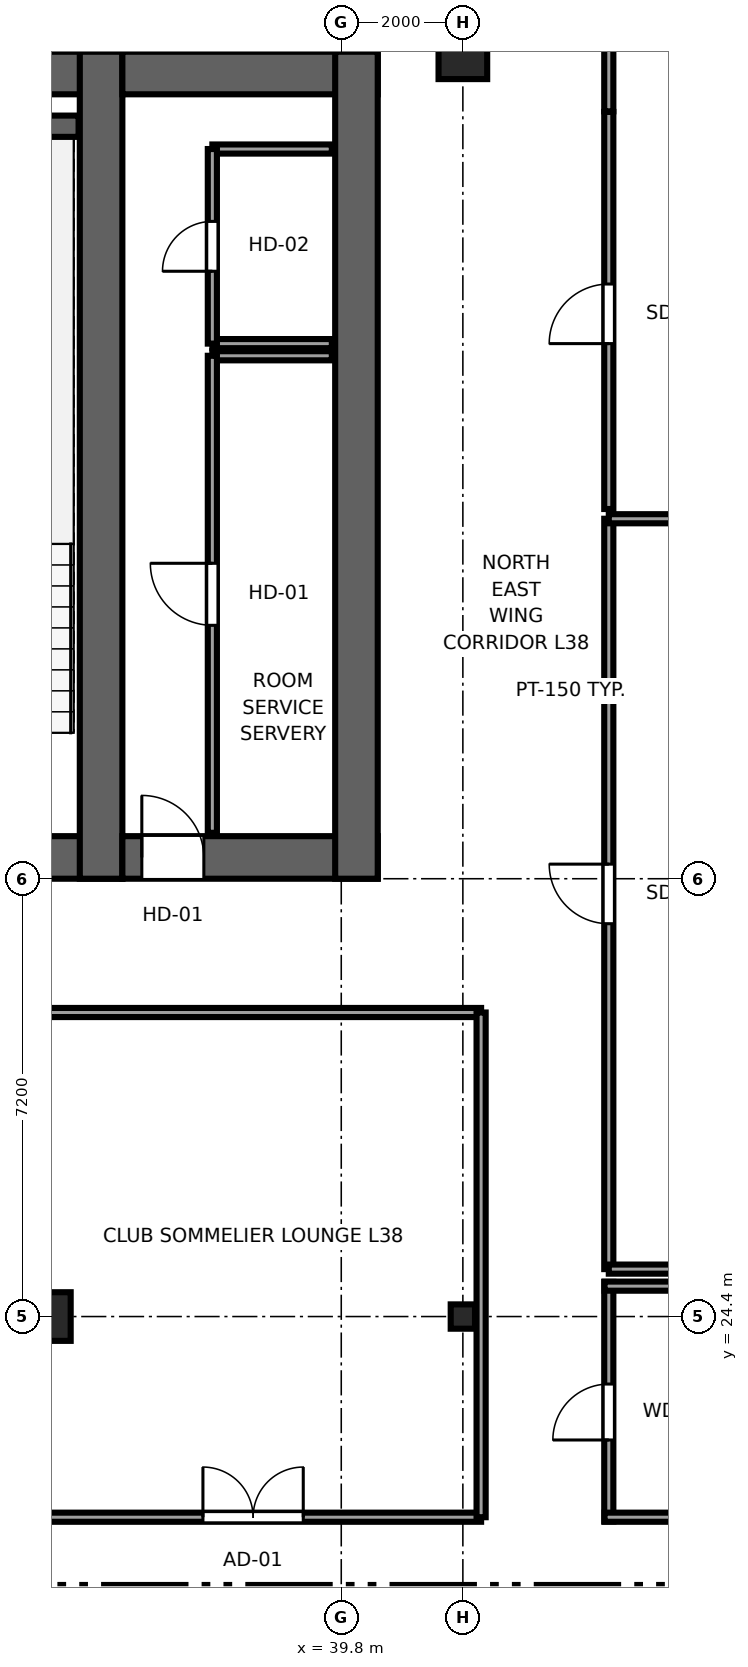
"""IFC4 building model, lengths in metres.
Left out: names, types, materials, properties, quantities, classifications, styles, units other than length and angle.
Written with IfcOpenShell. Run it as: python <this file> out.ifc"""

import sys

from ifc_helpers import new_model, si_unit, direction, frame, frame_2d, origin, origin_2d, place, context, subcontext, project, spatial, rectangle, i_section, extrude, source, transform, mapped, element, fill, save


model = new_model("IFC4")
c1 = context("Model", 3, precision=1e-05, world=origin(), true_north=direction((0.0, 1.0)))
c2 = subcontext(c1, "Body", "Model", "MODEL_VIEW")
j1 = project(units=[si_unit("LENGTHUNIT", "METRE"), si_unit("PLANEANGLEUNIT", "RADIAN")], contexts=[c1])
p1 = place(None, origin())
s1 = spatial("IfcSite", under=j1, at=p1, CompositionType="ELEMENT")
p2 = place(p1, origin())
s2 = spatial("IfcBuilding", under=s1, at=p2, CompositionType="ELEMENT")
p3 = place(p2, frame((0.0, 0.0, 147.05)))
s3 = spatial("IfcBuildingStorey", under=s2, at=p3, CompositionType="ELEMENT", Elevation=147.05)
p4 = place(p3, frame((9.8, 31.95, 0.0), z_axis=(0.0, 0.0, 1.0), x_axis=(1.0, 0.0, 0.0)))
e1 = element("IfcWall", 1, at=p4, inside=s3, PredefinedType="SHEAR", context=c2, shape_type="SweptSolid", body=[
    extrude(rectangle(XDim=26.4, YDim=0.7, at=frame_2d((13.2, 0.0))), origin(), (0.0, 0.0, 1.0), 3.55),
])
p5 = place(p4, frame((6.32, 0.0, 0.0), z_axis=(0.0, 0.0, 1.0), x_axis=(-1.0, 0.0, 0.0)))
e2 = element("IfcOpeningElement", 2, at=p5, cuts=e1, PredefinedType="OPENING", context=c2, shape_type="SweptSolid", body=[
    extrude(rectangle(XDim=1.5, YDim=2.04, at=frame_2d((0.75, 1.02))), frame((0.0, 0.36, 0.0), z_axis=(0.0, -1.0, 0.0), x_axis=(1.0, 0.0, 0.0)), (0.0, 0.0, 1.0), 0.72),
])
p6 = place(p4, frame((13.95, 0.0, 0.0), z_axis=(0.0, 0.0, 1.0), x_axis=(-1.0, 0.0, 0.0)))
e3 = element("IfcOpeningElement", 3, at=p6, cuts=e1, PredefinedType="OPENING", context=c2, shape_type="SweptSolid", body=[
    extrude(rectangle(XDim=1.5, YDim=2.04, at=frame_2d((0.75, 1.02))), frame((0.0, 0.36, 0.0), z_axis=(0.0, -1.0, 0.0), x_axis=(1.0, 0.0, 0.0)), (0.0, 0.0, 1.0), 0.72),
])
p7 = place(p4, frame((21.58, 0.0, 0.0), z_axis=(0.0, 0.0, 1.0), x_axis=(-1.0, 0.0, 0.0)))
e4 = element("IfcOpeningElement", 4, at=p7, cuts=e1, PredefinedType="OPENING", context=c2, shape_type="SweptSolid", body=[
    extrude(rectangle(XDim=1.5, YDim=2.04, at=frame_2d((0.75, 1.02))), frame((0.0, 0.36, 0.0), z_axis=(0.0, -1.0, 0.0), x_axis=(1.0, 0.0, 0.0)), (0.0, 0.0, 1.0), 0.72),
])
p8 = place(p4, frame((8.37, 0.0, 0.0), z_axis=(0.0, 0.0, 1.0), x_axis=(-1.0, 0.0, 0.0)))
e5 = element("IfcOpeningElement", 5, at=p8, cuts=e1, PredefinedType="OPENING", context=c2, shape_type="SweptSolid", body=[
    extrude(rectangle(XDim=0.82, YDim=2.01, at=frame_2d((0.41, 1.005))), frame((0.0, 0.36, 0.0), z_axis=(0.0, -1.0, 0.0), x_axis=(1.0, 0.0, 0.0)), (0.0, 0.0, 1.0), 0.72),
])
p9 = place(p4, frame((18.87, 0.0, 0.0), z_axis=(0.0, 0.0, 1.0), x_axis=(-1.0, 0.0, 0.0)))
e6 = element("IfcOpeningElement", 6, at=p9, cuts=e1, PredefinedType="OPENING", context=c2, shape_type="SweptSolid", body=[
    extrude(rectangle(XDim=0.82, YDim=2.01, at=frame_2d((0.41, 1.005))), frame((0.0, 0.36, 0.0), z_axis=(0.0, -1.0, 0.0), x_axis=(1.0, 0.0, 0.0)), (0.0, 0.0, 1.0), 0.72),
])
p10 = place(p3, frame((9.8, 44.85, 0.0), z_axis=(0.0, 0.0, 1.0), x_axis=(1.0, 0.0, 0.0)))
e7 = element("IfcWall", 7, at=p10, inside=s3, PredefinedType="SHEAR", context=c2, shape_type="SweptSolid", body=[
    extrude(rectangle(XDim=26.4, YDim=0.7, at=frame_2d((13.2, 0.0))), origin(), (0.0, 0.0, 1.0), 3.55),
])
p11 = place(p3, frame((35.85, 31.6, 0.0), z_axis=(0.0, 0.0, 1.0), x_axis=(0.0, 1.0, 0.0)))
e8 = element("IfcWall", 8, at=p11, inside=s3, PredefinedType="SHEAR", context=c2, shape_type="SweptSolid", body=[
    extrude(rectangle(XDim=13.6, YDim=0.7, at=frame_2d((6.8, 0.0))), origin(), (0.0, 0.0, 1.0), 3.55),
])
p12 = place(p3, frame((36.2, 31.95, 0.0), z_axis=(0.0, 0.0, 1.0), x_axis=(1.0, 0.0, 0.0)))
e9 = element("IfcWall", 9, at=p12, inside=s3, PredefinedType="SHEAR", context=c2, shape_type="SweptSolid", body=[
    extrude(rectangle(XDim=4.2, YDim=0.7, at=frame_2d((2.1, 0.0))), origin(), (0.0, 0.0, 1.0), 3.55),
])
p13 = place(p12, frame((1.34, 0.0, 0.0), z_axis=(0.0, 0.0, 1.0), x_axis=(-1.0, 0.0, 0.0)))
e10 = element("IfcOpeningElement", 10, at=p13, cuts=e9, PredefinedType="OPENING", context=c2, shape_type="SweptSolid", body=[
    extrude(rectangle(XDim=1.02, YDim=2.03, at=frame_2d((0.51, 1.015))), frame((0.0, 0.36, 0.0), z_axis=(0.0, -1.0, 0.0), x_axis=(1.0, 0.0, 0.0)), (0.0, 0.0, 1.0), 0.72),
])
p14 = place(p3, frame((36.2, 44.85, 0.0), z_axis=(0.0, 0.0, 1.0), x_axis=(1.0, 0.0, 0.0)))
e11 = element("IfcWall", 11, at=p14, inside=s3, PredefinedType="SHEAR", context=c2, shape_type="SweptSolid", body=[
    extrude(rectangle(XDim=4.2, YDim=0.7, at=frame_2d((2.1, 0.0))), origin(), (0.0, 0.0, 1.0), 3.55),
])
p15 = place(p3, frame((40.05, 31.6, 0.0), z_axis=(0.0, 0.0, 1.0), x_axis=(0.0, 1.0, 0.0)))
e12 = element("IfcWall", 12, at=p15, inside=s3, PredefinedType="SHEAR", context=c2, shape_type="SweptSolid", body=[
    extrude(rectangle(XDim=13.6, YDim=0.7, at=frame_2d((6.8, 0.0))), origin(), (0.0, 0.0, 1.0), 3.55),
])
p16 = place(p3, frame((31.88, 43.975, 0.0), z_axis=(0.0, 0.0, 1.0), x_axis=(1.0, 0.0, 0.0)))
e13 = element("IfcWall", 13, at=p16, inside=s3, PredefinedType="SHEAR", context=c2, shape_type="SweptSolid", body=[
    extrude(rectangle(XDim=3.6, YDim=0.35, at=frame_2d((1.8, 0.0))), origin(), (0.0, 0.0, 1.0), 3.55),
])
m1 = source(origin(), c2, "Body", "SweptSolid", [
    extrude(rectangle(XDim=0.8, YDim=0.8, at=origin_2d()), origin(), (0.0, 0.0, 1.0), 3.55),
])
p17 = place(p3, frame((34.95, 24.4, 0.0), z_axis=(0.0, 0.0, 1.0), x_axis=(1.0, 0.0, 0.0)))
e14 = element("IfcColumn", 14, at=p17, inside=s3, PredefinedType="COLUMN", context=c2, shape_type="MappedRepresentation", body=[
    mapped(m1, transform((0.0, 0.0, 0.0), x_axis=(1.0, 0.0, 0.0), y_axis=(0.0, 1.0, 0.0), z_axis=(0.0, 0.0, 1.0), scale=1.0)),
])
m2 = source(origin(), c2, "Body", "SweptSolid", [
    extrude(i_section(OverallWidth=0.4, OverallDepth=0.4, WebThickness=0.02, FlangeThickness=0.035, at=origin_2d()), origin(), (0.0, 0.0, 1.0), 3.55),
])
p18 = place(p3, frame((41.8, 24.4, 0.0), z_axis=(0.0, 0.0, 1.0), x_axis=(1.0, 0.0, 0.0)))
e15 = element("IfcColumn", 15, at=p18, inside=s3, PredefinedType="COLUMN", context=c2, shape_type="MappedRepresentation", body=[
    mapped(m2, transform((0.0, 0.0, 0.0), x_axis=(1.0, 0.0, 0.0), y_axis=(0.0, 1.0, 0.0), z_axis=(0.0, 0.0, 1.0), scale=1.0)),
])
p19 = place(p3, frame((41.8, 45.15, 0.0), z_axis=(0.0, 0.0, 1.0), x_axis=(1.0, 0.0, 0.0)))
e16 = element("IfcColumn", 16, at=p19, inside=s3, PredefinedType="COLUMN", context=c2, shape_type="MappedRepresentation", body=[
    mapped(m1, transform((0.0, 0.0, 0.0), x_axis=(1.0, 0.0, 0.0), y_axis=(0.0, 1.0, 0.0), z_axis=(0.0, 0.0, 1.0), scale=1.0)),
])
p20 = place(p3, frame((37.68, 40.2, 0.0), z_axis=(0.0, 0.0, 1.0), x_axis=(1.0, 0.0, 0.0)))
e17 = element("IfcWall", 17, at=p20, inside=s3, PredefinedType="PARTITIONING", context=c2, shape_type="SweptSolid", body=[
    extrude(rectangle(XDim=1.965, YDim=0.15, at=frame_2d((0.982, 0.0))), origin(), (0.0, 0.0, 1.0), 3.37),
])
p21 = place(p3, frame((37.68, 32.355, 0.0), z_axis=(0.0, 0.0, 1.0), x_axis=(0.0, 1.0, 0.0)))
e18 = element("IfcWall", 18, at=p21, inside=s3, PredefinedType="PARTITIONING", context=c2, shape_type="SweptSolid", body=[
    extrude(rectangle(XDim=7.845, YDim=0.15, at=frame_2d((3.922, 0.0))), origin(), (0.0, 0.0, 1.0), 3.37),
])
p22 = place(p21, frame((3.413, 0.0, 0.0)))
e19 = element("IfcOpeningElement", 19, at=p22, cuts=e18, PredefinedType="OPENING", context=c2, shape_type="SweptSolid", body=[
    extrude(rectangle(XDim=1.02, YDim=2.03, at=frame_2d((0.51, 1.015))), frame((0.0, 0.085, 0.0), z_axis=(0.0, -1.0, 0.0), x_axis=(1.0, 0.0, 0.0)), (0.0, 0.0, 1.0), 0.17),
])
for number, where, z_axis, x_axis in (
    (20, (37.68, 40.4, 0.0), (0.0, 0.0, 1.0), (1.0, 0.0, 0.0)),
    (21, (37.68, 43.6, 0.0), (0.0, 0.0, 1.0), (1.0, 0.0, 0.0)),
):
    element("IfcWall", number, at=place(p3, frame(where, z_axis=z_axis, x_axis=x_axis)), inside=s3, PredefinedType="PARTITIONING", context=c2, shape_type="SweptSolid", body=[
        extrude(rectangle(XDim=1.965, YDim=0.15, at=frame_2d((0.982, 0.0))), origin(), (0.0, 0.0, 1.0), 3.37),
    ])
p23 = place(p3, frame((37.68, 40.4, 0.0), z_axis=(0.0, 0.0, 1.0), x_axis=(0.0, 1.0, 0.0)))
e22 = element("IfcWall", 22, at=p23, inside=s3, PredefinedType="PARTITIONING", context=c2, shape_type="SweptSolid", body=[
    extrude(rectangle(XDim=3.2, YDim=0.15, at=frame_2d((1.6, 0.0))), origin(), (0.0, 0.0, 1.0), 3.37),
])
p24 = place(p23, frame((1.19, 0.0, 0.0)))
e23 = element("IfcOpeningElement", 23, at=p24, cuts=e22, PredefinedType="OPENING", context=c2, shape_type="SweptSolid", body=[
    extrude(rectangle(XDim=0.82, YDim=2.01, at=frame_2d((0.41, 1.005))), frame((0.0, 0.085, 0.0), z_axis=(0.0, -1.0, 0.0), x_axis=(1.0, 0.0, 0.0)), (0.0, 0.0, 1.0), 0.17),
])
p25 = place(p3, frame((44.2, 21.03, 0.0), z_axis=(0.0, 0.0, 1.0), x_axis=(0.0, 1.0, 0.0)))
e24 = element("IfcWall", 24, at=p25, inside=s3, PredefinedType="PARTITIONING", context=c2, shape_type="SweptSolid", body=[
    extrude(rectangle(XDim=3.94, YDim=0.15, at=frame_2d((1.97, 0.0))), origin(), (0.0, 0.0, 1.0), 3.37),
])
p26 = place(p25, frame((1.34, 0.0, 0.0)))
e25 = element("IfcOpeningElement", 25, at=p26, cuts=e24, PredefinedType="OPENING", context=c2, shape_type="SweptSolid", body=[
    extrude(rectangle(XDim=0.92, YDim=2.01, at=frame_2d((0.46, 1.005))), frame((0.0, 0.085, 0.0), z_axis=(0.0, -1.0, 0.0), x_axis=(1.0, 0.0, 0.0)), (0.0, 0.0, 1.0), 0.17),
])
for number, where, z_axis, x_axis in (
    (26, (44.13, 21.1, 0.0), (0.0, 0.0, 1.0), (1.0, 0.0, 0.0)),
    (27, (44.13, 24.9, 0.0), (0.0, 0.0, 1.0), (1.0, 0.0, 0.0)),
):
    element("IfcWall", number, at=place(p3, frame(where, z_axis=z_axis, x_axis=x_axis)), inside=s3, PredefinedType="PARTITIONING", context=c2, shape_type="SweptSolid", body=[
        extrude(rectangle(XDim=4.54, YDim=0.15, at=frame_2d((2.27, 0.0))), origin(), (0.0, 0.0, 1.0), 3.37),
    ])
p27 = place(p3, frame((44.2, 25.18, 0.0), z_axis=(0.0, 0.0, 1.0), x_axis=(0.0, 1.0, 0.0)))
e28 = element("IfcWall", 28, at=p27, inside=s3, PredefinedType="PARTITIONING", context=c2, shape_type="SweptSolid", body=[
    extrude(rectangle(XDim=12.34, YDim=0.15, at=frame_2d((6.17, 0.0))), origin(), (0.0, 0.0, 1.0), 3.37),
])
p28 = place(p27, frame((5.68, 0.0, 0.0)))
e29 = element("IfcOpeningElement", 29, at=p28, cuts=e28, PredefinedType="OPENING", context=c2, shape_type="SweptSolid", body=[
    extrude(rectangle(XDim=0.98, YDim=2.12, at=frame_2d((0.49, 1.06))), frame((0.0, 0.085, 0.0), z_axis=(0.0, -1.0, 0.0), x_axis=(1.0, 0.0, 0.0)), (0.0, 0.0, 1.0), 0.17),
])
p29 = place(p3, frame((44.2, 25.18, 0.0), z_axis=(0.0, 0.0, 1.0), x_axis=(1.0, 0.0, 0.0)))
e30 = element("IfcWall", 30, at=p29, inside=s3, PredefinedType="PARTITIONING", context=c2, shape_type="SweptSolid", body=[
    extrude(rectangle(XDim=9.795, YDim=0.15, at=frame_2d((4.897, 0.0))), origin(), (0.0, 0.0, 1.0), 3.37),
])
p30 = place(p3, frame((44.2, 37.52, 0.0), z_axis=(0.0, 0.0, 1.0), x_axis=(1.0, 0.0, 0.0)))
e31 = element("IfcWall", 31, at=p30, inside=s3, PredefinedType="PARTITIONING", context=c2, shape_type="SweptSolid", body=[
    extrude(rectangle(XDim=7.43, YDim=0.15, at=frame_2d((3.715, 0.0))), origin(), (0.0, 0.0, 1.0), 3.37),
])
p31 = place(p3, frame((44.2, 37.68, 0.0), z_axis=(0.0, 0.0, 1.0), x_axis=(0.0, 1.0, 0.0)))
e32 = element("IfcWall", 32, at=p31, inside=s3, PredefinedType="PARTITIONING", context=c2, shape_type="SweptSolid", body=[
    extrude(rectangle(XDim=6.53, YDim=0.15, at=frame_2d((3.265, 0.0))), origin(), (0.0, 0.0, 1.0), 3.37),
])
p32 = place(p31, frame((2.72, 0.0, 0.0)))
e33 = element("IfcOpeningElement", 33, at=p32, cuts=e32, PredefinedType="OPENING", context=c2, shape_type="SweptSolid", body=[
    extrude(rectangle(XDim=0.98, YDim=2.12, at=frame_2d((0.49, 1.06))), frame((0.0, 0.085, 0.0), z_axis=(0.0, -1.0, 0.0), x_axis=(1.0, 0.0, 0.0)), (0.0, 0.0, 1.0), 0.17),
])
p33 = place(p3, frame((44.2, 44.22, 0.0), z_axis=(0.0, 0.0, 1.0), x_axis=(0.0, 1.0, 0.0)))
e34 = element("IfcWall", 34, at=p33, inside=s3, PredefinedType="PARTITIONING", context=c2, shape_type="SweptSolid", body=[
    extrude(rectangle(XDim=1.375, YDim=0.15, at=frame_2d((0.688, 0.0))), origin(), (0.0, 0.0, 1.0), 3.37),
])
p34 = place(p3, frame((34.6, 21.1, 0.0), z_axis=(0.0, 0.0, 1.0), x_axis=(1.0, 0.0, 0.0)))
e35 = element("IfcWall", 35, at=p34, inside=s3, PredefinedType="PARTITIONING", context=c2, shape_type="SweptSolid", body=[
    extrude(rectangle(XDim=7.5, YDim=0.15, at=frame_2d((3.75, 0.0))), origin(), (0.0, 0.0, 1.0), 3.37),
])
p35 = place(p34, frame((2.925, 0.0, 0.0)))
e36 = element("IfcOpeningElement", 36, at=p35, cuts=e35, PredefinedType="OPENING", context=c2, shape_type="SweptSolid", body=[
    extrude(rectangle(XDim=1.65, YDim=2.15, at=frame_2d((0.825, 1.075))), frame((0.0, 0.085, 0.0), z_axis=(0.0, -1.0, 0.0), x_axis=(1.0, 0.0, 0.0)), (0.0, 0.0, 1.0), 0.17),
])
p36 = place(p3, frame((34.6, 29.4, 0.0), z_axis=(0.0, 0.0, 1.0), x_axis=(1.0, 0.0, 0.0)))
e37 = element("IfcWall", 37, at=p36, inside=s3, PredefinedType="PARTITIONING", context=c2, shape_type="SweptSolid", body=[
    extrude(rectangle(XDim=7.5, YDim=0.15, at=frame_2d((3.75, 0.0))), origin(), (0.0, 0.0, 1.0), 2.16),
])
p37 = place(p3, frame((42.1, 21.1, 0.0), z_axis=(0.0, 0.0, 1.0), x_axis=(0.0, 1.0, 0.0)))
e38 = element("IfcWall", 38, at=p37, inside=s3, PredefinedType="PARTITIONING", context=c2, shape_type="SweptSolid", body=[
    extrude(rectangle(XDim=8.3, YDim=0.15, at=frame_2d((4.15, 0.0))), origin(), (0.0, 0.0, 1.0), 2.16),
])
m3 = source(origin(), c2, "Body", "SweptSolid", [
    extrude(rectangle(XDim=1.02, YDim=2.03, at=frame_2d((0.51, 1.015))), frame((0.0, 0.025, 0.0), z_axis=(0.0, -1.0, 0.0), x_axis=(1.0, 0.0, 0.0)), (0.0, 0.0, 1.0), 0.05),
])
p38 = place(p13, origin())
e39 = element("IfcDoor", 39, at=p38, inside=s3, OperationType="SINGLE_SWING_LEFT", PredefinedType="DOOR", context=c2, shape_type="MappedRepresentation", body=[
    mapped(m3, transform((0.0, 0.0, 0.0), x_axis=(1.0, 0.0, 0.0), y_axis=(0.0, 1.0, 0.0), z_axis=(0.0, 0.0, 1.0), scale=1.0)),
])
fill(e10, e39)
p39 = place(p22, origin())
e40 = element("IfcDoor", 40, at=p39, inside=s3, OperationType="SINGLE_SWING_RIGHT", PredefinedType="DOOR", context=c2, shape_type="MappedRepresentation", body=[
    mapped(m3, transform((0.0, 0.0, 0.0), x_axis=(1.0, 0.0, 0.0), y_axis=(0.0, 1.0, 0.0), z_axis=(0.0, 0.0, 1.0), scale=1.0)),
])
fill(e19, e40)
m4 = source(origin(), c2, "Body", "SweptSolid", [
    extrude(rectangle(XDim=0.82, YDim=2.01, at=frame_2d((0.41, 1.005))), frame((0.0, 0.025, 0.0), z_axis=(0.0, -1.0, 0.0), x_axis=(1.0, 0.0, 0.0)), (0.0, 0.0, 1.0), 0.05),
])
p40 = place(p24, origin())
e41 = element("IfcDoor", 41, at=p40, inside=s3, OperationType="SINGLE_SWING_LEFT", PredefinedType="DOOR", context=c2, shape_type="MappedRepresentation", body=[
    mapped(m4, transform((0.0, 0.0, 0.0), x_axis=(1.0, 0.0, 0.0), y_axis=(0.0, 1.0, 0.0), z_axis=(0.0, 0.0, 1.0), scale=1.0)),
])
fill(e23, e41)
m5 = source(origin(), c2, "Body", "SweptSolid", [
    extrude(rectangle(XDim=0.92, YDim=2.01, at=frame_2d((0.46, 1.005))), frame((0.0, 0.025, 0.0), z_axis=(0.0, -1.0, 0.0), x_axis=(1.0, 0.0, 0.0)), (0.0, 0.0, 1.0), 0.05),
])
p41 = place(p26, origin())
e42 = element("IfcDoor", 42, at=p41, inside=s3, OperationType="SINGLE_SWING_LEFT", PredefinedType="DOOR", context=c2, shape_type="MappedRepresentation", body=[
    mapped(m5, transform((0.0, 0.0, 0.0), x_axis=(1.0, 0.0, 0.0), y_axis=(0.0, 1.0, 0.0), z_axis=(0.0, 0.0, 1.0), scale=1.0)),
])
fill(e25, e42)
m6 = source(origin(), c2, "Body", "SweptSolid", [
    extrude(rectangle(XDim=0.98, YDim=2.12, at=frame_2d((0.49, 1.06))), frame((0.0, 0.025, 0.0), z_axis=(0.0, -1.0, 0.0), x_axis=(1.0, 0.0, 0.0)), (0.0, 0.0, 1.0), 0.05),
])
p42 = place(p28, origin())
e43 = element("IfcDoor", 43, at=p42, inside=s3, OperationType="SINGLE_SWING_RIGHT", PredefinedType="DOOR", context=c2, shape_type="MappedRepresentation", body=[
    mapped(m6, transform((0.0, 0.0, 0.0), x_axis=(1.0, 0.0, 0.0), y_axis=(0.0, 1.0, 0.0), z_axis=(0.0, 0.0, 1.0), scale=1.0)),
])
fill(e29, e43)
p43 = place(p32, origin())
e44 = element("IfcDoor", 44, at=p43, inside=s3, OperationType="SINGLE_SWING_LEFT", PredefinedType="DOOR", context=c2, shape_type="MappedRepresentation", body=[
    mapped(m6, transform((0.0, 0.0, 0.0), x_axis=(1.0, 0.0, 0.0), y_axis=(0.0, 1.0, 0.0), z_axis=(0.0, 0.0, 1.0), scale=1.0)),
])
fill(e33, e44)
m7 = source(origin(), c2, "Body", "SweptSolid", [
    extrude(rectangle(XDim=1.65, YDim=2.15, at=frame_2d((0.825, 1.075))), frame((0.0, 0.025, 0.0), z_axis=(0.0, -1.0, 0.0), x_axis=(1.0, 0.0, 0.0)), (0.0, 0.0, 1.0), 0.05),
])
p44 = place(p35, origin())
e45 = element("IfcDoor", 45, at=p44, inside=s3, OperationType="DOUBLE_DOOR_SINGLE_SWING", PredefinedType="DOOR", context=c2, shape_type="MappedRepresentation", body=[
    mapped(m7, transform((0.0, 0.0, 0.0), x_axis=(1.0, 0.0, 0.0), y_axis=(0.0, 1.0, 0.0), z_axis=(0.0, 0.0, 1.0), scale=1.0)),
])
fill(e36, e45)
save(model, sys.argv[1])
